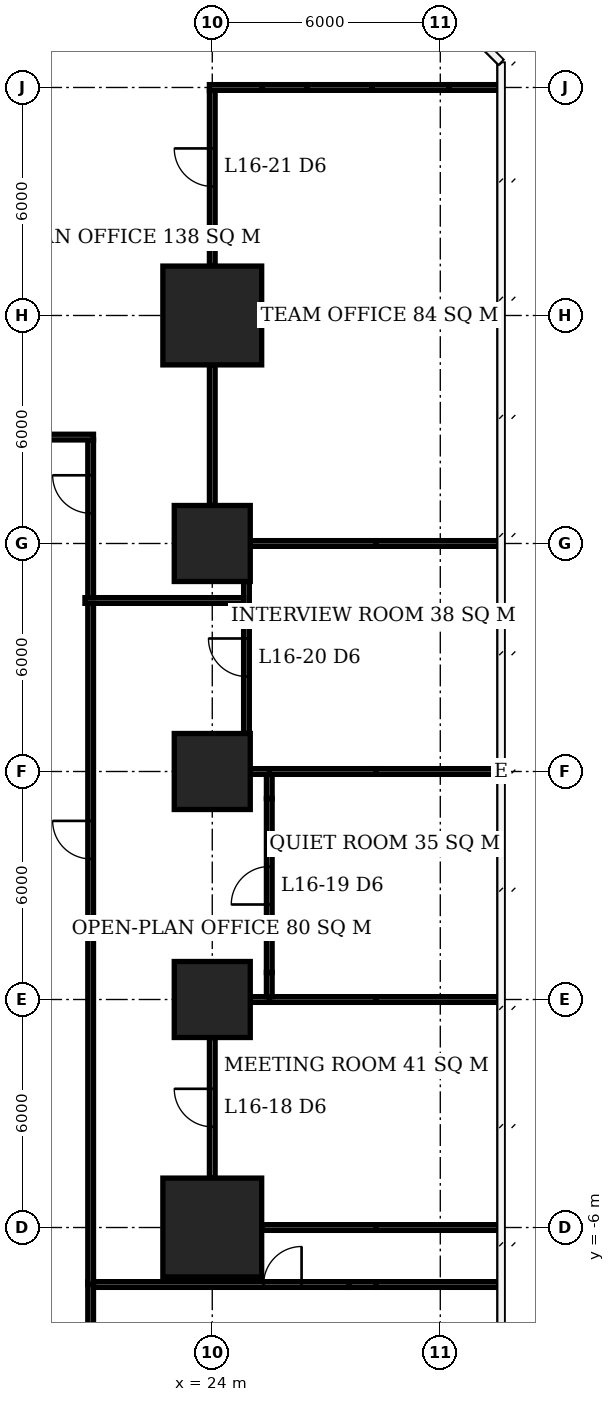
"""IFC4 building model, lengths in metres.
Left out: names, types, materials, properties, quantities, classifications, styles, units other than length and angle.
Written with IfcOpenShell. Run it as: python <this file> out.ifc"""

import sys

from ifc_helpers import new_model, si_unit, direction, frame, frame_2d, origin, origin_2d, place, context, subcontext, project, spatial, rectangle, extrude, element, fill, save


model = new_model("IFC4")
c1 = context("Model", 3, precision=1e-05, world=origin(), true_north=direction((0.0, 1.0)))
c2 = subcontext(c1, "Body", "Model", "MODEL_VIEW")
j1 = project(units=[si_unit("LENGTHUNIT", "METRE"), si_unit("PLANEANGLEUNIT", "RADIAN")], contexts=[c1])
p1 = place(None, origin())
s1 = spatial("IfcSite", under=j1, at=p1, CompositionType="ELEMENT")
p2 = place(p1, origin())
s2 = spatial("IfcBuilding", under=s1, at=p2, CompositionType="ELEMENT")
p3 = place(p2, frame((0.0, 0.0, 68.9)))
s3 = spatial("IfcBuildingStorey", under=s2, at=p3, CompositionType="ELEMENT", Elevation=68.9)
p4 = place(p3, frame((24.0, -6.0, 0.0), z_axis=(0.0, 0.0, 1.0), x_axis=(1.0, 0.0, 0.0)))
e1 = element("IfcColumn", 1, at=p4, inside=s3, PredefinedType="COLUMN", context=c2, shape_type="SweptSolid", body=[
    extrude(rectangle(XDim=2.6, YDim=2.6, at=origin_2d()), origin(), (0.0, 0.0, 1.0), 3.9),
])
for number, where, z_axis, x_axis in (
    (2, (24.0, 0.0, 0.0), (0.0, 0.0, 1.0), (1.0, 0.0, 0.0)),
    (3, (24.0, 6.0, 0.0), (0.0, 0.0, 1.0), (1.0, 0.0, 0.0)),
    (4, (24.0, 12.0, 0.0), (0.0, 0.0, 1.0), (1.0, 0.0, 0.0)),
):
    element("IfcColumn", number, at=place(p3, frame(where, z_axis=z_axis, x_axis=x_axis)), inside=s3, PredefinedType="COLUMN", context=c2, shape_type="SweptSolid", body=[
        extrude(rectangle(XDim=2.0, YDim=2.0, at=origin_2d()), origin(), (0.0, 0.0, 1.0), 3.9),
    ])
p5 = place(p3, frame((24.0, 18.0, 0.0), z_axis=(0.0, 0.0, 1.0), x_axis=(1.0, 0.0, 0.0)))
e5 = element("IfcColumn", 5, at=p5, inside=s3, PredefinedType="COLUMN", context=c2, shape_type="SweptSolid", body=[
    extrude(rectangle(XDim=2.6, YDim=2.6, at=origin_2d()), origin(), (0.0, 0.0, 1.0), 3.9),
])
p6 = place(p3, frame((25.3, -6.0, 0.0), z_axis=(0.0, 0.0, 1.0), x_axis=(1.0, 0.0, 0.0)))
e6 = element("IfcWall", 6, at=p6, inside=s3, PredefinedType="PARTITIONING", context=c2, shape_type="SweptSolid", body=[
    extrude(rectangle(XDim=3.01, YDim=0.15, at=frame_2d((1.505, 0.0))), origin(), (0.0, 0.0, 1.0), 2.65),
])
p7 = place(p3, frame((28.31, -6.0, 0.0), z_axis=(0.0, 0.0, 1.0), x_axis=(1.0, 0.0, 0.0)))
e7 = element("IfcWall", 7, at=p7, inside=s3, PredefinedType="PARTITIONING", context=c2, shape_type="SweptSolid", body=[
    extrude(rectangle(XDim=3.29, YDim=0.15, at=frame_2d((1.645, 0.0))), origin(), (0.0, 0.0, 1.0), 3.65),
])
p8 = place(p3, frame((25.0, 0.0, 0.0), z_axis=(0.0, 0.0, 1.0), x_axis=(1.0, 0.0, 0.0)))
e8 = element("IfcWall", 8, at=p8, inside=s3, PredefinedType="PARTITIONING", context=c2, shape_type="SweptSolid", body=[
    extrude(rectangle(XDim=0.575, YDim=0.15, at=frame_2d((0.288, 0.0))), origin(), (0.0, 0.0, 1.0), 2.65),
])
p9 = place(p3, frame((25.5, 0.0, 0.0), z_axis=(0.0, 0.0, 1.0), x_axis=(1.0, 0.0, 0.0)))
e9 = element("IfcWall", 9, at=p9, inside=s3, PredefinedType="PARTITIONING", context=c2, shape_type="SweptSolid", body=[
    extrude(rectangle(XDim=2.81, YDim=0.15, at=frame_2d((1.405, 0.0))), origin(), (0.0, 0.0, 1.0), 2.65),
])
p10 = place(p3, frame((28.31, 0.0, 0.0), z_axis=(0.0, 0.0, 1.0), x_axis=(1.0, 0.0, 0.0)))
e10 = element("IfcWall", 10, at=p10, inside=s3, PredefinedType="PARTITIONING", context=c2, shape_type="SweptSolid", body=[
    extrude(rectangle(XDim=3.29, YDim=0.15, at=frame_2d((1.645, 0.0))), origin(), (0.0, 0.0, 1.0), 3.65),
])
p11 = place(p3, frame((25.0, 6.0, 0.0), z_axis=(0.0, 0.0, 1.0), x_axis=(1.0, 0.0, 0.0)))
e11 = element("IfcWall", 11, at=p11, inside=s3, PredefinedType="PARTITIONING", context=c2, shape_type="SweptSolid", body=[
    extrude(rectangle(XDim=0.575, YDim=0.15, at=frame_2d((0.288, 0.0))), origin(), (0.0, 0.0, 1.0), 2.65),
])
p12 = place(p3, frame((25.5, 6.0, 0.0), z_axis=(0.0, 0.0, 1.0), x_axis=(1.0, 0.0, 0.0)))
e12 = element("IfcWall", 12, at=p12, inside=s3, PredefinedType="PARTITIONING", context=c2, shape_type="SweptSolid", body=[
    extrude(rectangle(XDim=2.81, YDim=0.15, at=frame_2d((1.405, 0.0))), origin(), (0.0, 0.0, 1.0), 2.65),
])
p13 = place(p3, frame((28.31, 6.0, 0.0), z_axis=(0.0, 0.0, 1.0), x_axis=(1.0, 0.0, 0.0)))
e13 = element("IfcWall", 13, at=p13, inside=s3, PredefinedType="PARTITIONING", context=c2, shape_type="SweptSolid", body=[
    extrude(rectangle(XDim=3.24, YDim=0.15, at=frame_2d((1.62, 0.0))), origin(), (0.0, 0.0, 1.0), 3.65),
])
p14 = place(p3, frame((25.0, 12.0, 0.0), z_axis=(0.0, 0.0, 1.0), x_axis=(1.0, 0.0, 0.0)))
e14 = element("IfcWall", 14, at=p14, inside=s3, PredefinedType="PARTITIONING", context=c2, shape_type="SweptSolid", body=[
    extrude(rectangle(XDim=3.31, YDim=0.15, at=frame_2d((1.655, 0.0))), origin(), (0.0, 0.0, 1.0), 2.65),
])
p15 = place(p3, frame((28.31, 12.0, 0.0), z_axis=(0.0, 0.0, 1.0), x_axis=(1.0, 0.0, 0.0)))
e15 = element("IfcWall", 15, at=p15, inside=s3, PredefinedType="PARTITIONING", context=c2, shape_type="SweptSolid", body=[
    extrude(rectangle(XDim=3.29, YDim=0.15, at=frame_2d((1.645, 0.0))), origin(), (0.0, 0.0, 1.0), 3.65),
])
p16 = place(p3, frame((23.925, 24.0, 0.0), z_axis=(0.0, 0.0, 1.0), x_axis=(1.0, 0.0, 0.0)))
e16 = element("IfcWall", 16, at=p16, inside=s3, PredefinedType="PARTITIONING", context=c2, shape_type="SweptSolid", body=[
    extrude(rectangle(XDim=1.385, YDim=0.15, at=frame_2d((0.692, 0.0))), origin(), (0.0, 0.0, 1.0), 3.65),
])
p17 = place(p3, frame((25.31, 24.0, 0.0), z_axis=(0.0, 0.0, 1.0), x_axis=(1.0, 0.0, 0.0)))
e17 = element("IfcWall", 17, at=p17, inside=s3, PredefinedType="PARTITIONING", context=c2, shape_type="SweptSolid", body=[
    extrude(rectangle(XDim=1.18, YDim=0.15, at=frame_2d((0.59, 0.0))), origin(), (0.0, 0.0, 1.0), 2.65),
])
p18 = place(p3, frame((26.49, 24.0, 0.0), z_axis=(0.0, 0.0, 1.0), x_axis=(1.0, 0.0, 0.0)))
e18 = element("IfcWall", 18, at=p18, inside=s3, PredefinedType="PARTITIONING", context=c2, shape_type="SweptSolid", body=[
    extrude(rectangle(XDim=1.718, YDim=0.15, at=frame_2d((0.859, 0.0))), origin(), (0.0, 0.0, 1.0), 3.65),
])
p19 = place(p3, frame((28.208, 24.0, 0.0), z_axis=(0.0, 0.0, 1.0), x_axis=(1.0, 0.0, 0.0)))
e19 = element("IfcWall", 19, at=p19, inside=s3, PredefinedType="PARTITIONING", context=c2, shape_type="SweptSolid", body=[
    extrude(rectangle(XDim=2.029, YDim=0.15, at=frame_2d((1.015, 0.0))), origin(), (0.0, 0.0, 1.0), 2.65),
])
p20 = place(p3, frame((30.237, 24.0, 0.0), z_axis=(0.0, 0.0, 1.0), x_axis=(1.0, 0.0, 0.0)))
e20 = element("IfcWall", 20, at=p20, inside=s3, PredefinedType="PARTITIONING", context=c2, shape_type="SweptSolid", body=[
    extrude(rectangle(XDim=1.363, YDim=0.15, at=frame_2d((0.682, 0.0))), origin(), (0.0, 0.0, 1.0), 3.65),
])
p21 = place(p3, frame((24.0, -4.7, 0.0), z_axis=(0.0, 0.0, 1.0), x_axis=(0.0, 1.0, 0.0)))
e21 = element("IfcWall", 21, at=p21, inside=s3, PredefinedType="PARTITIONING", context=c2, shape_type="SweptSolid", body=[
    extrude(rectangle(XDim=3.7, YDim=0.15, at=frame_2d((1.85, 0.0))), origin(), (0.0, 0.0, 1.0), 3.65),
])
p22 = place(p21, frame((1.35, 0.0, 0.0)))
e22 = element("IfcOpeningElement", 22, at=p22, cuts=e21, PredefinedType="OPENING", context=c2, shape_type="SweptSolid", body=[
    extrude(rectangle(XDim=1.0, YDim=2.1, at=frame_2d((0.5, 1.05))), frame((0.0, 0.085, 0.0), z_axis=(0.0, -1.0, 0.0), x_axis=(1.0, 0.0, 0.0)), (0.0, 0.0, 1.0), 0.17),
])
p23 = place(p3, frame((24.0, 13.0, 0.0), z_axis=(0.0, 0.0, 1.0), x_axis=(0.0, 1.0, 0.0)))
e23 = element("IfcWall", 23, at=p23, inside=s3, PredefinedType="PARTITIONING", context=c2, shape_type="SweptSolid", body=[
    extrude(rectangle(XDim=3.7, YDim=0.15, at=frame_2d((1.85, 0.0))), origin(), (0.0, 0.0, 1.0), 3.65),
])
p24 = place(p3, frame((24.0, 19.3, 0.0), z_axis=(0.0, 0.0, 1.0), x_axis=(0.0, 1.0, 0.0)))
e24 = element("IfcWall", 24, at=p24, inside=s3, PredefinedType="PARTITIONING", context=c2, shape_type="SweptSolid", body=[
    extrude(rectangle(XDim=0.492, YDim=0.15, at=frame_2d((0.246, 0.0))), origin(), (0.0, 0.0, 1.0), 2.65),
])
p25 = place(p3, frame((24.0, 19.792, 0.0), z_axis=(0.0, 0.0, 1.0), x_axis=(0.0, 1.0, 0.0)))
e25 = element("IfcWall", 25, at=p25, inside=s3, PredefinedType="PARTITIONING", context=c2, shape_type="SweptSolid", body=[
    extrude(rectangle(XDim=4.133, YDim=0.15, at=frame_2d((2.066, 0.0))), origin(), (0.0, 0.0, 1.0), 3.65),
])
p26 = place(p25, frame((1.604, 0.0, 0.0)))
e26 = element("IfcOpeningElement", 26, at=p26, cuts=e25, PredefinedType="OPENING", context=c2, shape_type="SweptSolid", body=[
    extrude(rectangle(XDim=1.0, YDim=2.1, at=frame_2d((0.5, 1.05))), frame((0.0, 0.085, 0.0), z_axis=(0.0, -1.0, 0.0), x_axis=(1.0, 0.0, 0.0)), (0.0, 0.0, 1.0), 0.17),
])
p27 = place(p3, frame((24.9, 7.0, 0.0), z_axis=(0.0, 0.0, 1.0), x_axis=(0.0, 1.0, 0.0)))
e27 = element("IfcWall", 27, at=p27, inside=s3, PredefinedType="PARTITIONING", context=c2, shape_type="SweptSolid", body=[
    extrude(rectangle(XDim=4.0, YDim=0.15, at=frame_2d((2.0, 0.0))), origin(), (0.0, 0.0, 1.0), 3.65),
])
p28 = place(p27, frame((1.5, 0.0, 0.0)))
e28 = element("IfcOpeningElement", 28, at=p28, cuts=e27, PredefinedType="OPENING", context=c2, shape_type="SweptSolid", body=[
    extrude(rectangle(XDim=1.0, YDim=2.1, at=frame_2d((0.5, 1.05))), frame((0.0, 0.085, 0.0), z_axis=(0.0, -1.0, 0.0), x_axis=(1.0, 0.0, 0.0)), (0.0, 0.0, 1.0), 0.17),
])
p29 = place(p3, frame((25.5, 0.075, 0.0), z_axis=(0.0, 0.0, 1.0), x_axis=(0.0, 1.0, 0.0)))
e29 = element("IfcWall", 29, at=p29, inside=s3, PredefinedType="PARTITIONING", context=c2, shape_type="SweptSolid", body=[
    extrude(rectangle(XDim=0.635, YDim=0.15, at=frame_2d((0.317, 0.0))), origin(), (0.0, 0.0, 1.0), 2.65),
])
p30 = place(p3, frame((25.5, 0.71, 0.0), z_axis=(0.0, 0.0, 1.0), x_axis=(0.0, 1.0, 0.0)))
e30 = element("IfcWall", 30, at=p30, inside=s3, PredefinedType="PARTITIONING", context=c2, shape_type="SweptSolid", body=[
    extrude(rectangle(XDim=4.58, YDim=0.15, at=frame_2d((2.29, 0.0))), origin(), (0.0, 0.0, 1.0), 3.65),
])
p31 = place(p30, frame((1.79, 0.0, 0.0)))
e31 = element("IfcOpeningElement", 31, at=p31, cuts=e30, PredefinedType="OPENING", context=c2, shape_type="SweptSolid", body=[
    extrude(rectangle(XDim=1.0, YDim=2.1, at=frame_2d((0.5, 1.05))), frame((0.0, 0.085, 0.0), z_axis=(0.0, -1.0, 0.0), x_axis=(1.0, 0.0, 0.0)), (0.0, 0.0, 1.0), 0.17),
])
p32 = place(p3, frame((25.5, 5.29, 0.0), z_axis=(0.0, 0.0, 1.0), x_axis=(0.0, 1.0, 0.0)))
e32 = element("IfcWall", 32, at=p32, inside=s3, PredefinedType="PARTITIONING", context=c2, shape_type="SweptSolid", body=[
    extrude(rectangle(XDim=0.635, YDim=0.15, at=frame_2d((0.317, 0.0))), origin(), (0.0, 0.0, 1.0), 2.65),
])
p33 = place(p3, frame((19.4, 14.8, 0.0), z_axis=(0.0, 0.0, 1.0), x_axis=(1.0, 0.0, 0.0)))
e33 = element("IfcWall", 33, at=p33, inside=s3, PredefinedType="PARTITIONING", context=c2, shape_type="SweptSolid", body=[
    extrude(rectangle(XDim=1.475, YDim=0.15, at=frame_2d((0.738, 0.0))), origin(), (0.0, 0.0, 1.0), 3.65),
])
p34 = place(p3, frame((20.8, -8.725, 0.0), z_axis=(0.0, 0.0, 1.0), x_axis=(0.0, 1.0, 0.0)))
e34 = element("IfcWall", 34, at=p34, inside=s3, PredefinedType="PARTITIONING", context=c2, shape_type="SweptSolid", body=[
    extrude(rectangle(XDim=1.3, YDim=0.15, at=frame_2d((0.65, 0.0))), origin(), (0.0, 0.0, 1.0), 3.65),
])
p35 = place(p3, frame((20.8, -7.5, 0.0), z_axis=(0.0, 0.0, 1.0), x_axis=(0.0, 1.0, 0.0)))
e35 = element("IfcWall", 35, at=p35, inside=s3, PredefinedType="PARTITIONING", context=c2, shape_type="SweptSolid", body=[
    extrude(rectangle(XDim=17.925, YDim=0.15, at=frame_2d((8.962, 0.0))), origin(), (0.0, 0.0, 1.0), 3.65),
])
p36 = place(p35, frame((11.2, 0.0, 0.0)))
e36 = element("IfcOpeningElement", 36, at=p36, cuts=e35, PredefinedType="OPENING", context=c2, shape_type="SweptSolid", body=[
    extrude(rectangle(XDim=1.0, YDim=2.1, at=frame_2d((0.5, 1.05))), frame((0.0, 0.085, 0.0), z_axis=(0.0, -1.0, 0.0), x_axis=(1.0, 0.0, 0.0)), (0.0, 0.0, 1.0), 0.17),
])
p37 = place(p3, frame((20.875, -7.5, 0.0), z_axis=(0.0, 0.0, 1.0), x_axis=(1.0, 0.0, 0.0)))
e37 = element("IfcWall", 37, at=p37, inside=s3, PredefinedType="PARTITIONING", context=c2, shape_type="SweptSolid", body=[
    extrude(rectangle(XDim=6.715, YDim=0.15, at=frame_2d((3.357, 0.0))), origin(), (0.0, 0.0, 1.0), 3.65),
])
p38 = place(p37, frame((4.475, 0.0, 0.0)))
e38 = element("IfcOpeningElement", 38, at=p38, cuts=e37, PredefinedType="OPENING", context=c2, shape_type="SweptSolid", body=[
    extrude(rectangle(XDim=1.0, YDim=2.1, at=frame_2d((0.5, 1.05))), frame((0.0, 0.085, 0.0), z_axis=(0.0, -1.0, 0.0), x_axis=(1.0, 0.0, 0.0)), (0.0, 0.0, 1.0), 0.17),
])
p39 = place(p3, frame((27.59, -7.5, 0.0), z_axis=(0.0, 0.0, 1.0), x_axis=(1.0, 0.0, 0.0)))
e39 = element("IfcWall", 39, at=p39, inside=s3, PredefinedType="PARTITIONING", context=c2, shape_type="SweptSolid", body=[
    extrude(rectangle(XDim=0.72, YDim=0.15, at=frame_2d((0.36, 0.0))), origin(), (0.0, 0.0, 1.0), 2.65),
])
p40 = place(p3, frame((28.31, -7.5, 0.0), z_axis=(0.0, 0.0, 1.0), x_axis=(1.0, 0.0, 0.0)))
e40 = element("IfcWall", 40, at=p40, inside=s3, PredefinedType="PARTITIONING", context=c2, shape_type="SweptSolid", body=[
    extrude(rectangle(XDim=3.29, YDim=0.15, at=frame_2d((1.645, 0.0))), origin(), (0.0, 0.0, 1.0), 3.65),
])
p41 = place(p3, frame((20.8, 10.575, 0.0), z_axis=(0.0, 0.0, 1.0), x_axis=(0.0, 1.0, 0.0)))
e41 = element("IfcWall", 41, at=p41, inside=s3, PredefinedType="PARTITIONING", context=c2, shape_type="SweptSolid", body=[
    extrude(rectangle(XDim=4.15, YDim=0.15, at=frame_2d((2.075, 0.0))), origin(), (0.0, 0.0, 1.0), 3.65),
])
p42 = place(p41, frame((2.22, 0.0, 0.0)))
e42 = element("IfcOpeningElement", 42, at=p42, cuts=e41, PredefinedType="OPENING", context=c2, shape_type="SweptSolid", body=[
    extrude(rectangle(XDim=1.0, YDim=2.1, at=frame_2d((0.5, 1.05))), frame((0.0, 0.085, 0.0), z_axis=(0.0, -1.0, 0.0), x_axis=(1.0, 0.0, 0.0)), (0.0, 0.0, 1.0), 0.17),
])
p43 = place(p3, frame((20.65, 10.5, 0.0), z_axis=(0.0, 0.0, 1.0), x_axis=(1.0, 0.0, 0.0)))
e43 = element("IfcWall", 43, at=p43, inside=s3, PredefinedType="PARTITIONING", context=c2, shape_type="SweptSolid", body=[
    extrude(rectangle(XDim=4.175, YDim=0.15, at=frame_2d((2.087, 0.0))), origin(), (0.0, 0.0, 1.0), 3.65),
])
p44 = place(p22, origin())
e44 = element("IfcDoor", 44, at=p44, inside=s3, OperationType="SINGLE_SWING_RIGHT", PredefinedType="DOOR", context=c2, shape_type="SweptSolid", body=[
    extrude(rectangle(XDim=1.0, YDim=2.1, at=frame_2d((0.5, 1.05))), frame((0.0, 0.025, 0.0), z_axis=(0.0, -1.0, 0.0), x_axis=(1.0, 0.0, 0.0)), (0.0, 0.0, 1.0), 0.05),
])
fill(e22, e44)
p45 = place(p31, origin())
e45 = element("IfcDoor", 45, at=p45, inside=s3, OperationType="SINGLE_SWING_LEFT", PredefinedType="DOOR", context=c2, shape_type="SweptSolid", body=[
    extrude(rectangle(XDim=1.0, YDim=2.1, at=frame_2d((0.5, 1.05))), frame((0.0, 0.025, 0.0), z_axis=(0.0, -1.0, 0.0), x_axis=(1.0, 0.0, 0.0)), (0.0, 0.0, 1.0), 0.05),
])
fill(e31, e45)
p46 = place(p28, origin())
e46 = element("IfcDoor", 46, at=p46, inside=s3, OperationType="SINGLE_SWING_RIGHT", PredefinedType="DOOR", context=c2, shape_type="SweptSolid", body=[
    extrude(rectangle(XDim=1.0, YDim=2.1, at=frame_2d((0.5, 1.05))), frame((0.0, 0.025, 0.0), z_axis=(0.0, -1.0, 0.0), x_axis=(1.0, 0.0, 0.0)), (0.0, 0.0, 1.0), 0.05),
])
fill(e28, e46)
p47 = place(p26, origin())
e47 = element("IfcDoor", 47, at=p47, inside=s3, OperationType="SINGLE_SWING_RIGHT", PredefinedType="DOOR", context=c2, shape_type="SweptSolid", body=[
    extrude(rectangle(XDim=1.0, YDim=2.1, at=frame_2d((0.5, 1.05))), frame((0.0, 0.025, 0.0), z_axis=(0.0, -1.0, 0.0), x_axis=(1.0, 0.0, 0.0)), (0.0, 0.0, 1.0), 0.05),
])
fill(e26, e47)
p48 = place(p36, origin())
e48 = element("IfcDoor", 48, at=p48, inside=s3, OperationType="SINGLE_SWING_RIGHT", PredefinedType="DOOR", context=c2, shape_type="SweptSolid", body=[
    extrude(rectangle(XDim=1.0, YDim=2.1, at=frame_2d((0.5, 1.05))), frame((0.0, 0.025, 0.0), z_axis=(0.0, -1.0, 0.0), x_axis=(1.0, 0.0, 0.0)), (0.0, 0.0, 1.0), 0.05),
])
fill(e36, e48)
p49 = place(p42, origin())
e49 = element("IfcDoor", 49, at=p49, inside=s3, OperationType="SINGLE_SWING_RIGHT", PredefinedType="DOOR", context=c2, shape_type="SweptSolid", body=[
    extrude(rectangle(XDim=1.0, YDim=2.1, at=frame_2d((0.5, 1.05))), frame((0.0, 0.025, 0.0), z_axis=(0.0, -1.0, 0.0), x_axis=(1.0, 0.0, 0.0)), (0.0, 0.0, 1.0), 0.05),
])
fill(e42, e49)
p50 = place(p38, origin())
e50 = element("IfcDoor", 50, at=p50, inside=s3, OperationType="SINGLE_SWING_RIGHT", PredefinedType="DOOR", context=c2, shape_type="SweptSolid", body=[
    extrude(rectangle(XDim=1.0, YDim=2.1, at=frame_2d((0.5, 1.05))), frame((0.0, 0.025, 0.0), z_axis=(0.0, -1.0, 0.0), x_axis=(1.0, 0.0, 0.0)), (0.0, 0.0, 1.0), 0.05),
])
fill(e38, e50)
save(model, sys.argv[1])
